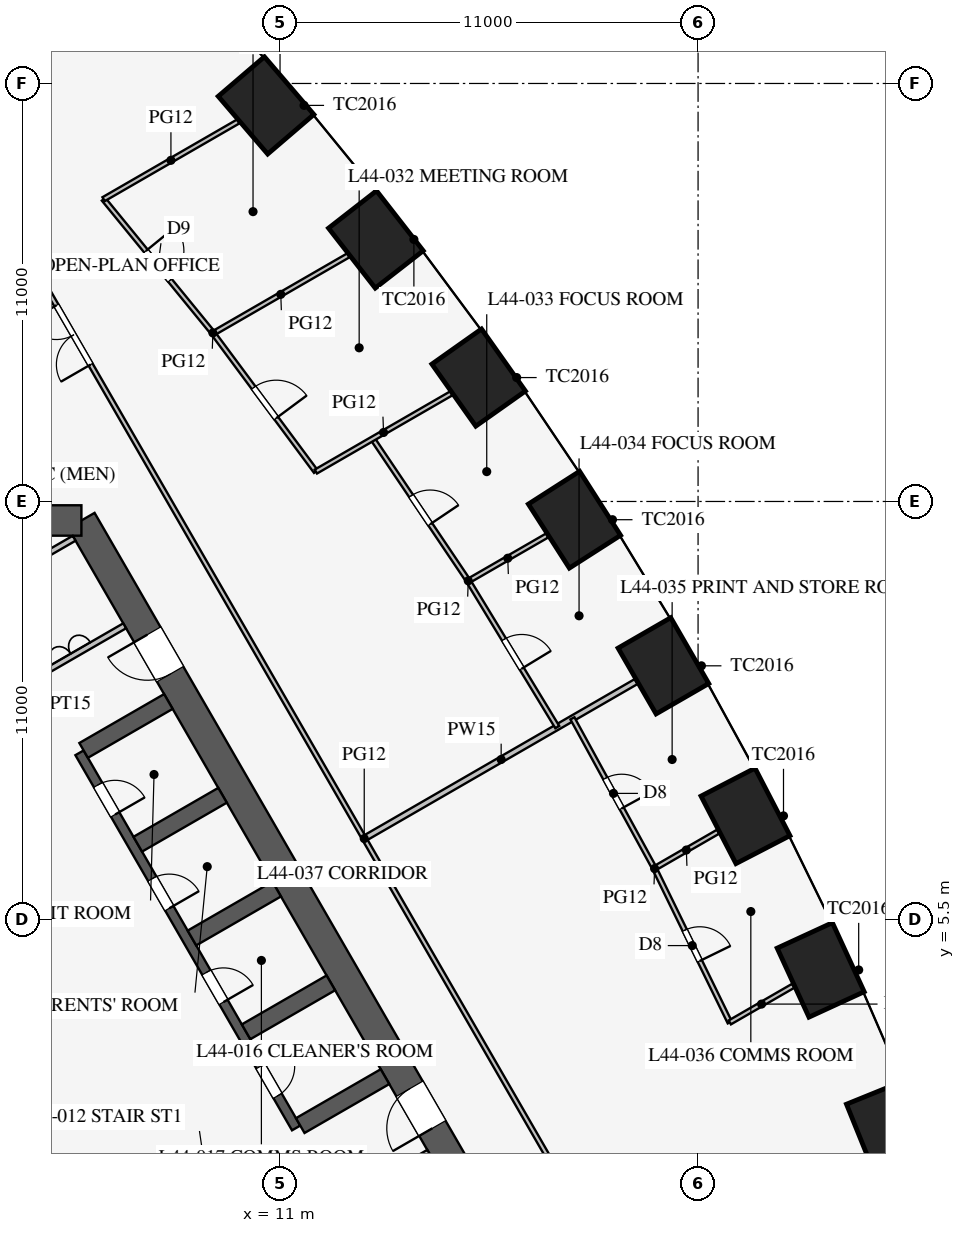
"""IFC4 building model, lengths in metres.
Left out: names, types, materials, properties, quantities, classifications, styles, units other than length and angle.
Written with IfcOpenShell. Run it as: python <this file> out.ifc"""

import sys

from ifc_helpers import new_model, si_unit, direction, frame, frame_2d, origin, origin_2d, place, context, subcontext, project, spatial, rectangle, extrude, element, fill, save


model = new_model("IFC4")
c1 = context("Model", 3, precision=1e-05, world=origin(), true_north=direction((0.0, 1.0)))
c2 = subcontext(c1, "Body", "Model", "MODEL_VIEW")
j1 = project(units=[si_unit("LENGTHUNIT", "METRE"), si_unit("PLANEANGLEUNIT", "RADIAN")], contexts=[c1])
p1 = place(None, origin())
s1 = spatial("IfcSite", under=j1, at=p1, CompositionType="ELEMENT")
p2 = place(p1, origin())
s2 = spatial("IfcBuilding", under=s1, at=p2, CompositionType="ELEMENT")
p3 = place(p2, frame((0.0, 0.0, 193.9)))
s3 = spatial("IfcBuildingStorey", under=s2, at=p3, CompositionType="ELEMENT", Elevation=193.9)
for number, where, z_axis, x_axis in (
    (1, (27.022, 0.013, 0.0), (0.0, 0.0, 1.0), (-0.376, 0.927, 0.0)),
    (2, (25.227, 4.172, 0.0), (0.0, 0.0, 1.0), (-0.418, 0.908, 0.0)),
    (3, (23.248, 8.226, 0.0), (0.0, 0.0, 1.0), (-0.46, 0.888, 0.0)),
    (4, (21.088, 12.175, 0.0), (0.0, 0.0, 1.0), (-0.5, 0.866, 0.0)),
    (5, (18.748, 16.02, 0.0), (0.0, 0.0, 1.0), (-0.539, 0.842, 0.0)),
    (6, (16.227, 19.761, 0.0), (0.0, 0.0, 1.0), (-0.577, 0.816, 0.0)),
    (7, (13.522, 23.396, 0.0), (0.0, 0.0, 1.0), (-0.615, 0.789, 0.0)),
    (8, (10.632, 26.923, 0.0), (0.0, 0.0, 1.0), (-0.651, 0.759, 0.0)),
):
    element("IfcColumn", number, at=place(p3, frame(where, z_axis=z_axis, x_axis=x_axis)), inside=s3, PredefinedType="COLUMN", context=c2, shape_type="SweptSolid", body=[
        extrude(rectangle(XDim=2.0, YDim=1.6, at=origin_2d()), origin(), (0.0, 0.0, 1.0), 4.2),
    ])
p4 = place(p3, frame((16.743, -3.0, 0.0), z_axis=(0.0, 0.0, 1.0), x_axis=(-0.500002442456, 0.866023993627, 0.0)))
e9 = element("IfcWall", 9, at=p4, inside=s3, PredefinedType="SHEAR", context=c2, shape_type="SweptSolid", body=[
    extrude(rectangle(XDim=21.939, YDim=0.8, at=frame_2d((10.97, 0.0))), origin(), (0.0, 0.0, 1.0), 4.2),
])
p5 = place(p4, frame((17.27, 0.0, 0.0)))
e10 = element("IfcOpeningElement", 10, at=p5, cuts=e9, PredefinedType="OPENING", context=c2, shape_type="SweptSolid", body=[
    extrude(rectangle(XDim=1.2, YDim=2.1, at=frame_2d((0.6, 1.05))), frame((0.0, 0.41, 0.0), z_axis=(0.0, -1.0, 0.0), x_axis=(1.0, 0.0, 0.0)), (0.0, 0.0, 1.0), 0.82),
])
p6 = place(p4, frame((3.47, 0.0, 0.0)))
e11 = element("IfcOpeningElement", 11, at=p6, cuts=e9, PredefinedType="OPENING", context=c2, shape_type="SweptSolid", body=[
    extrude(rectangle(XDim=1.2, YDim=2.1, at=frame_2d((0.6, 1.05))), frame((0.0, 0.41, 0.0), z_axis=(0.0, -1.0, 0.0), x_axis=(1.0, 0.0, 0.0)), (0.0, 0.0, 1.0), 0.82),
])
p7 = place(p3, frame((5.773, 16.0, 0.0), z_axis=(0.0, 0.0, 1.0), x_axis=(-1.0, 0.0, 0.0)))
e12 = element("IfcWall", 12, at=p7, inside=s3, PredefinedType="SHEAR", context=c2, shape_type="SweptSolid", body=[
    extrude(rectangle(XDim=11.547, YDim=0.8, at=frame_2d((5.773, 0.0))), origin(), (0.0, 0.0, 1.0), 4.2),
])
p8 = place(p3, frame((11.424, 0.014, 0.0), z_axis=(0.0, 0.0, 1.0), x_axis=(-0.500001763848, 0.866024385424, 0.0)))
e13 = element("IfcWall", 13, at=p8, inside=s3, PredefinedType="SHEAR", context=c2, shape_type="SweptSolid", body=[
    extrude(rectangle(XDim=11.4, YDim=0.25, at=frame_2d((5.7, 0.0))), origin(), (0.0, 0.0, 1.0), 4.2),
])
p9 = place(p8, frame((0.975, 0.0, 0.0)))
e14 = element("IfcOpeningElement", 14, at=p9, cuts=e13, PredefinedType="OPENING", context=c2, shape_type="SweptSolid", body=[
    extrude(rectangle(XDim=0.9, YDim=2.1, at=frame_2d((0.45, 1.05))), frame((0.0, 0.135, 0.0), z_axis=(0.0, -1.0, 0.0), x_axis=(1.0, 0.0, 0.0)), (0.0, 0.0, 1.0), 0.27),
])
p10 = place(p8, frame((3.825, 0.0, 0.0)))
e15 = element("IfcOpeningElement", 15, at=p10, cuts=e13, PredefinedType="OPENING", context=c2, shape_type="SweptSolid", body=[
    extrude(rectangle(XDim=0.9, YDim=2.1, at=frame_2d((0.45, 1.05))), frame((0.0, 0.135, 0.0), z_axis=(0.0, -1.0, 0.0), x_axis=(1.0, 0.0, 0.0)), (0.0, 0.0, 1.0), 0.27),
])
p11 = place(p8, frame((6.675, 0.0, 0.0)))
e16 = element("IfcOpeningElement", 16, at=p11, cuts=e13, PredefinedType="OPENING", context=c2, shape_type="SweptSolid", body=[
    extrude(rectangle(XDim=0.9, YDim=2.1, at=frame_2d((0.45, 1.05))), frame((0.0, 0.135, 0.0), z_axis=(0.0, -1.0, 0.0), x_axis=(1.0, 0.0, 0.0)), (0.0, 0.0, 1.0), 0.27),
])
p12 = place(p8, frame((9.525, 0.0, 0.0)))
e17 = element("IfcOpeningElement", 17, at=p12, cuts=e13, PredefinedType="OPENING", context=c2, shape_type="SweptSolid", body=[
    extrude(rectangle(XDim=0.9, YDim=2.1, at=frame_2d((0.45, 1.05))), frame((0.0, 0.135, 0.0), z_axis=(0.0, -1.0, 0.0), x_axis=(1.0, 0.0, 0.0)), (0.0, 0.0, 1.0), 0.27),
])
for number, where, z_axis, x_axis in (
    (18, (11.532, 0.076, 0.0), (0.0, 0.0, 1.0), (0.866, 0.5, 0.0)),
    (19, (10.107, 2.544, 0.0), (0.0, 0.0, 1.0), (0.866, 0.5, 0.0)),
    (20, (8.682, 5.012, 0.0), (0.0, 0.0, 1.0), (0.866, 0.5, 0.0)),
    (21, (7.257, 7.481, 0.0), (0.0, 0.0, 1.0), (0.866, 0.5, 0.0)),
):
    element("IfcWall", number, at=place(p3, frame(where, z_axis=z_axis, x_axis=x_axis)), inside=s3, PredefinedType="SHEAR", context=c2, shape_type="SweptSolid", body=[
        extrude(rectangle(XDim=2.575, YDim=0.45, at=frame_2d((1.288, 0.0))), origin(), (0.0, 0.0, 1.0), 4.2),
    ])
p13 = place(p3, frame((5.832, 9.949, 0.0), z_axis=(0.0, 0.0, 1.0), x_axis=(0.866029291668, 0.499993265928, 0.0)))
e22 = element("IfcWall", 22, at=p13, inside=s3, PredefinedType="SHEAR", context=c2, shape_type="SweptSolid", body=[
    extrude(rectangle(XDim=2.575, YDim=0.45, at=frame_2d((1.288, 0.0))), origin(), (0.0, 0.0, 1.0), 4.2),
])
p14 = place(p3, frame((2.495, 10.678, 0.0), z_axis=(0.0, 0.0, 1.0), x_axis=(0.86602216432, 0.500005610874, 0.0)))
e23 = element("IfcWall", 23, at=p14, inside=s3, PredefinedType="PARTITIONING", context=c2, shape_type="SweptSolid", body=[
    extrude(rectangle(XDim=5.1, YDim=0.15, at=frame_2d((2.55, 0.0))), origin(), (0.0, 0.0, 1.0), 4.0),
])
p15 = place(p14, frame((1.3, 0.0, 0.0)))
e24 = element("IfcOpeningElement", 24, at=p15, cuts=e23, PredefinedType="OPENING", context=c2, shape_type="SweptSolid", body=[
    extrude(rectangle(XDim=0.9, YDim=2.1, at=frame_2d((0.45, 1.05))), frame((0.0, 0.085, 0.0), z_axis=(0.0, -1.0, 0.0), x_axis=(1.0, 0.0, 0.0)), (0.0, 0.0, 1.0), 0.17),
])
p16 = place(p3, frame((10.495, -3.178, 0.0), z_axis=(0.0, 0.0, 1.0), x_axis=(0.86602216432, 0.500005610874, 0.0)))
e25 = element("IfcWall", 25, at=p16, inside=s3, PredefinedType="PARTITIONING", context=c2, shape_type="SweptSolid", body=[
    extrude(rectangle(XDim=5.1, YDim=0.15, at=frame_2d((2.55, 0.0))), origin(), (0.0, 0.0, 1.0), 4.0),
])
p17 = place(p16, frame((2.6, 0.0, 0.0)))
e26 = element("IfcOpeningElement", 26, at=p17, cuts=e25, PredefinedType="OPENING", context=c2, shape_type="SweptSolid", body=[
    extrude(rectangle(XDim=0.9, YDim=2.1, at=frame_2d((0.45, 1.05))), frame((0.0, 0.085, 0.0), z_axis=(0.0, -1.0, 0.0), x_axis=(1.0, 0.0, 0.0)), (0.0, 0.0, 1.0), 0.17),
])
p18 = place(p3, frame((2.031, 13.482, 0.0), z_axis=(0.0, 0.0, 1.0), x_axis=(0.866050731258, 0.499956128963, 0.0)))
e27 = element("IfcWall", 27, at=p18, inside=s3, PredefinedType="PARTITIONING", context=c2, shape_type="SweptSolid", body=[
    extrude(rectangle(XDim=4.1, YDim=0.15, at=frame_2d((2.05, 0.0))), origin(), (0.0, 0.0, 1.0), 4.0),
])
p19 = place(p3, frame((13.268, 7.66, 0.0), z_axis=(0.0, 0.0, 1.0), x_axis=(0.866019499219, 0.500010226868, 0.0)))
e28 = element("IfcWall", 28, at=p19, inside=s3, PredefinedType="PARTITIONING", context=c2, shape_type="SweptSolid", body=[
    extrude(rectangle(XDim=8.2, YDim=0.15, at=frame_2d((4.1, 0.0))), origin(), (0.0, 0.0, 1.0), 2.992),
])
p20 = place(p3, frame((26.415, -15.231, 0.0), z_axis=(0.0, 0.0, 1.0), x_axis=(-0.50000091641, 0.866024874695, 0.0)))
e29 = element("IfcWall", 29, at=p20, inside=s3, PredefinedType="PARTITIONING", context=c2, shape_type="SweptSolid", body=[
    extrude(rectangle(XDim=52.796, YDim=0.12, at=frame_2d((26.398, 0.0))), origin(), (0.0, 0.0, 1.0), 2.9),
])
p21 = place(p20, frame((10.2, 0.0, 0.15)))
e30 = element("IfcOpeningElement", 30, at=p21, cuts=e29, PredefinedType="OPENING", context=c2, shape_type="SweptSolid", body=[
    extrude(rectangle(XDim=1.8, YDim=2.1, at=frame_2d((0.9, 1.05))), frame((0.0, 0.07, 0.0), z_axis=(0.0, -1.0, 0.0), x_axis=(1.0, 0.0, 0.0)), (0.0, 0.0, 1.0), 0.14),
])
p22 = place(p20, frame((40.8, 0.0, 0.15)))
e31 = element("IfcOpeningElement", 31, at=p22, cuts=e29, PredefinedType="OPENING", context=c2, shape_type="SweptSolid", body=[
    extrude(rectangle(XDim=1.8, YDim=2.1, at=frame_2d((0.9, 1.05))), frame((0.0, 0.07, 0.0), z_axis=(0.0, -1.0, 0.0), x_axis=(1.0, 0.0, 0.0)), (0.0, 0.0, 1.0), 0.14),
])
p23 = place(p3, frame((18.295, 10.563, 0.0), z_axis=(0.0, 0.0, 1.0), x_axis=(-0.519766265397, 0.854308509472, 0.0)))
e32 = element("IfcWall", 32, at=p23, inside=s3, PredefinedType="PARTITIONING", context=c2, shape_type="SweptSolid", body=[
    extrude(rectangle(XDim=4.501, YDim=0.12, at=frame_2d((2.25, 0.0))), origin(), (0.0, 0.0, 1.0), 2.9),
])
p24 = place(p23, frame((1.8, 0.0, 0.15)))
e33 = element("IfcOpeningElement", 33, at=p24, cuts=e32, PredefinedType="OPENING", context=c2, shape_type="SweptSolid", body=[
    extrude(rectangle(XDim=0.9, YDim=2.1, at=frame_2d((0.45, 1.05))), frame((0.0, 0.07, 0.0), z_axis=(0.0, -1.0, 0.0), x_axis=(1.0, 0.0, 0.0)), (0.0, 0.0, 1.0), 0.14),
])
p25 = place(p3, frame((9.242, 20.924, 0.0), z_axis=(0.0, 0.0, 1.0), x_axis=(-0.632765292047, 0.774343647989, 0.0)))
e34 = element("IfcWall", 34, at=p25, inside=s3, PredefinedType="PARTITIONING", context=c2, shape_type="SweptSolid", body=[
    extrude(rectangle(XDim=4.559, YDim=0.12, at=frame_2d((2.28, 0.0))), origin(), (0.0, 0.0, 1.0), 2.9),
])
p26 = place(p25, frame((1.8, 0.0, 0.15)))
e35 = element("IfcOpeningElement", 35, at=p26, cuts=e34, PredefinedType="OPENING", context=c2, shape_type="SweptSolid", body=[
    extrude(rectangle(XDim=1.0, YDim=2.1, at=frame_2d((0.5, 1.05))), frame((0.0, 0.07, 0.0), z_axis=(0.0, -1.0, 0.0), x_axis=(1.0, 0.0, 0.0)), (0.0, 0.0, 1.0), 0.14),
])
p27 = place(p3, frame((15.956, 14.408, 0.0), z_axis=(0.0, 0.0, 1.0), x_axis=(-0.55850386778, 0.829501916619, 0.0)))
e36 = element("IfcWall", 36, at=p27, inside=s3, PredefinedType="PARTITIONING", context=c2, shape_type="SweptSolid", body=[
    extrude(rectangle(XDim=4.511, YDim=0.12, at=frame_2d((2.255, 0.0))), origin(), (0.0, 0.0, 1.0), 2.9),
])
p28 = place(p27, frame((1.8, 0.0, 0.15)))
e37 = element("IfcOpeningElement", 37, at=p28, cuts=e36, PredefinedType="OPENING", context=c2, shape_type="SweptSolid", body=[
    extrude(rectangle(XDim=0.9, YDim=2.1, at=frame_2d((0.45, 1.05))), frame((0.0, 0.07, 0.0), z_axis=(0.0, -1.0, 0.0), x_axis=(1.0, 0.0, 0.0)), (0.0, 0.0, 1.0), 0.14),
])
p29 = place(p3, frame((11.943, 17.287, 0.0), z_axis=(0.0, 0.0, 1.0), x_axis=(-0.59613842716, 0.802881669777, 0.0)))
e38 = element("IfcWall", 38, at=p29, inside=s3, PredefinedType="PARTITIONING", context=c2, shape_type="SweptSolid", body=[
    extrude(rectangle(XDim=4.53, YDim=0.12, at=frame_2d((2.265, 0.0))), origin(), (0.0, 0.0, 1.0), 2.9),
])
p30 = place(p29, frame((1.75, 0.0, 0.15)))
e39 = element("IfcOpeningElement", 39, at=p30, cuts=e38, PredefinedType="OPENING", context=c2, shape_type="SweptSolid", body=[
    extrude(rectangle(XDim=1.0, YDim=2.1, at=frame_2d((0.5, 1.05))), frame((0.0, 0.07, 0.0), z_axis=(0.0, -1.0, 0.0), x_axis=(1.0, 0.0, 0.0)), (0.0, 0.0, 1.0), 0.14),
])
p31 = place(p3, frame((20.854, 6.844, 0.0), z_axis=(0.0, 0.0, 1.0), x_axis=(-0.480014565702, 0.877260518155, 0.0)))
e40 = element("IfcWall", 40, at=p31, inside=s3, PredefinedType="PARTITIONING", context=c2, shape_type="SweptSolid", body=[
    extrude(rectangle(XDim=4.501, YDim=0.12, at=frame_2d((2.25, 0.0))), origin(), (0.0, 0.0, 1.0), 2.9),
])
p32 = place(p31, frame((1.8, 0.0, 0.15)))
e41 = element("IfcOpeningElement", 41, at=p32, cuts=e40, PredefinedType="OPENING", context=c2, shape_type="SweptSolid", body=[
    extrude(rectangle(XDim=0.9, YDim=2.1, at=frame_2d((0.45, 1.05))), frame((0.0, 0.07, 0.0), z_axis=(0.0, -1.0, 0.0), x_axis=(1.0, 0.0, 0.0)), (0.0, 0.0, 1.0), 0.14),
])
p33 = place(p3, frame((22.835, 2.792, 0.0), z_axis=(0.0, 0.0, 1.0), x_axis=(-0.43911984878, 0.898428493764, 0.0)))
e42 = element("IfcWall", 42, at=p33, inside=s3, PredefinedType="PARTITIONING", context=c2, shape_type="SweptSolid", body=[
    extrude(rectangle(XDim=4.511, YDim=0.12, at=frame_2d((2.255, 0.0))), origin(), (0.0, 0.0, 1.0), 2.9),
])
p34 = place(p33, frame((1.8, 0.0, 0.15)))
e43 = element("IfcOpeningElement", 43, at=p34, cuts=e42, PredefinedType="OPENING", context=c2, shape_type="SweptSolid", body=[
    extrude(rectangle(XDim=0.9, YDim=2.1, at=frame_2d((0.45, 1.05))), frame((0.0, 0.07, 0.0), z_axis=(0.0, -1.0, 0.0), x_axis=(1.0, 0.0, 0.0)), (0.0, 0.0, 1.0), 0.14),
])
p35 = place(p3, frame((9.242, 20.924, 0.0), z_axis=(0.0, 0.0, 1.0), x_axis=(0.866016197294, 0.500015945769, 0.0)))
e44 = element("IfcWall", 44, at=p35, inside=s3, PredefinedType="PARTITIONING", context=c2, shape_type="SweptSolid", body=[
    extrude(rectangle(XDim=4.104, YDim=0.12, at=frame_2d((2.052, 0.0))), origin(), (0.0, 0.0, 1.0), 2.8),
])
p36 = place(p3, frame((6.357, 24.455, 0.0), z_axis=(0.0, 0.0, 1.0), x_axis=(0.866005746929, 0.500034045127, 0.0)))
e45 = element("IfcWall", 45, at=p36, inside=s3, PredefinedType="PARTITIONING", context=c2, shape_type="SweptSolid", body=[
    extrude(rectangle(XDim=4.092, YDim=0.12, at=frame_2d((2.046, 0.0))), origin(), (0.0, 0.0, 1.0), 2.8),
])
p37 = place(p3, frame((15.956, 14.408, 0.0), z_axis=(0.0, 0.0, 1.0), x_axis=(0.86598681336, 0.50006683462, 0.0)))
e46 = element("IfcWall", 46, at=p37, inside=s3, PredefinedType="PARTITIONING", context=c2, shape_type="SweptSolid", body=[
    extrude(rectangle(XDim=2.393, YDim=0.12, at=frame_2d((1.197, 0.0))), origin(), (0.0, 0.0, 1.0), 2.9),
])
p38 = place(p3, frame((11.943, 17.287, 0.0), z_axis=(0.0, 0.0, 1.0), x_axis=(0.866013591525, 0.500020458876, 0.0)))
e47 = element("IfcWall", 47, at=p38, inside=s3, PredefinedType="PARTITIONING", context=c2, shape_type="SweptSolid", body=[
    extrude(rectangle(XDim=4.113, YDim=0.12, at=frame_2d((2.057, 0.0))), origin(), (0.0, 0.0, 1.0), 2.9),
])
p39 = place(p3, frame((20.854, 6.844, 0.0), z_axis=(0.0, 0.0, 1.0), x_axis=(0.866019431537, 0.500010344094, 0.0)))
e48 = element("IfcWall", 48, at=p39, inside=s3, PredefinedType="PARTITIONING", context=c2, shape_type="SweptSolid", body=[
    extrude(rectangle(XDim=1.933, YDim=0.12, at=frame_2d((0.967, 0.0))), origin(), (0.0, 0.0, 1.0), 2.9),
])
p40 = place(p3, frame((22.835, 2.792, 0.0), z_axis=(0.0, 0.0, 1.0), x_axis=(0.865997904316, 0.500047627452, 0.0)))
e49 = element("IfcWall", 49, at=p40, inside=s3, PredefinedType="PARTITIONING", context=c2, shape_type="SweptSolid", body=[
    extrude(rectangle(XDim=1.928, YDim=0.12, at=frame_2d((0.964, 0.0))), origin(), (0.0, 0.0, 1.0), 2.9),
])
p41 = place(p5, origin())
e50 = element("IfcDoor", 50, at=p41, inside=s3, OperationType="SINGLE_SWING_RIGHT", PredefinedType="DOOR", context=c2, shape_type="SweptSolid", body=[
    extrude(rectangle(XDim=1.2, YDim=2.1, at=frame_2d((0.6, 1.05))), frame((0.0, 0.025, 0.0), z_axis=(0.0, -1.0, 0.0), x_axis=(1.0, 0.0, 0.0)), (0.0, 0.0, 1.0), 0.05),
])
fill(e10, e50)
p42 = place(p6, origin())
e51 = element("IfcDoor", 51, at=p42, inside=s3, OperationType="SINGLE_SWING_LEFT", PredefinedType="DOOR", context=c2, shape_type="SweptSolid", body=[
    extrude(rectangle(XDim=1.2, YDim=2.1, at=frame_2d((0.6, 1.05))), frame((0.0, 0.025, 0.0), z_axis=(0.0, -1.0, 0.0), x_axis=(1.0, 0.0, 0.0)), (0.0, 0.0, 1.0), 0.05),
])
fill(e11, e51)
p43 = place(p9, frame((0.9, 0.0, 0.0), z_axis=(0.0, 0.0, 1.0), x_axis=(-1.0, 0.0, 0.0)))
e52 = element("IfcDoor", 52, at=p43, inside=s3, OperationType="SINGLE_SWING_LEFT", PredefinedType="DOOR", context=c2, shape_type="SweptSolid", body=[
    extrude(rectangle(XDim=0.9, YDim=2.1, at=frame_2d((0.45, 1.05))), frame((0.0, 0.025, 0.0), z_axis=(0.0, -1.0, 0.0), x_axis=(1.0, 0.0, 0.0)), (0.0, 0.0, 1.0), 0.05),
])
fill(e14, e52)
p44 = place(p10, frame((0.9, 0.0, 0.0), z_axis=(0.0, 0.0, 1.0), x_axis=(-1.0, 0.0, 0.0)))
e53 = element("IfcDoor", 53, at=p44, inside=s3, OperationType="SINGLE_SWING_RIGHT", PredefinedType="DOOR", context=c2, shape_type="SweptSolid", body=[
    extrude(rectangle(XDim=0.9, YDim=2.1, at=frame_2d((0.45, 1.05))), frame((0.0, 0.025, 0.0), z_axis=(0.0, -1.0, 0.0), x_axis=(1.0, 0.0, 0.0)), (0.0, 0.0, 1.0), 0.05),
])
fill(e15, e53)
p45 = place(p11, frame((0.9, 0.0, 0.0), z_axis=(0.0, 0.0, 1.0), x_axis=(-1.0, 0.0, 0.0)))
e54 = element("IfcDoor", 54, at=p45, inside=s3, OperationType="SINGLE_SWING_RIGHT", PredefinedType="DOOR", context=c2, shape_type="SweptSolid", body=[
    extrude(rectangle(XDim=0.9, YDim=2.1, at=frame_2d((0.45, 1.05))), frame((0.0, 0.025, 0.0), z_axis=(0.0, -1.0, 0.0), x_axis=(1.0, 0.0, 0.0)), (0.0, 0.0, 1.0), 0.05),
])
fill(e16, e54)
p46 = place(p12, frame((0.9, 0.0, 0.0), z_axis=(0.0, 0.0, 1.0), x_axis=(-1.0, 0.0, 0.0)))
e55 = element("IfcDoor", 55, at=p46, inside=s3, OperationType="SINGLE_SWING_RIGHT", PredefinedType="DOOR", context=c2, shape_type="SweptSolid", body=[
    extrude(rectangle(XDim=0.9, YDim=2.1, at=frame_2d((0.45, 1.05))), frame((0.0, 0.025, 0.0), z_axis=(0.0, -1.0, 0.0), x_axis=(1.0, 0.0, 0.0)), (0.0, 0.0, 1.0), 0.05),
])
fill(e17, e55)
p47 = place(p26, frame((1.0, 0.0, 0.0), z_axis=(0.0, 0.0, 1.0), x_axis=(-1.0, 0.0, 0.0)))
e56 = element("IfcDoor", 56, at=p47, inside=s3, OperationType="SINGLE_SWING_LEFT", PredefinedType="DOOR", context=c2, shape_type="SweptSolid", body=[
    extrude(rectangle(XDim=1.0, YDim=2.1, at=frame_2d((0.5, 1.05))), frame((0.0, 0.025, 0.0), z_axis=(0.0, -1.0, 0.0), x_axis=(1.0, 0.0, 0.0)), (0.0, 0.0, 1.0), 0.05),
])
fill(e35, e56)
p48 = place(p30, frame((1.0, 0.0, 0.0), z_axis=(0.0, 0.0, 1.0), x_axis=(-1.0, 0.0, 0.0)))
e57 = element("IfcDoor", 57, at=p48, inside=s3, OperationType="SINGLE_SWING_RIGHT", PredefinedType="DOOR", context=c2, shape_type="SweptSolid", body=[
    extrude(rectangle(XDim=1.0, YDim=2.1, at=frame_2d((0.5, 1.05))), frame((0.0, 0.025, 0.0), z_axis=(0.0, -1.0, 0.0), x_axis=(1.0, 0.0, 0.0)), (0.0, 0.0, 1.0), 0.05),
])
fill(e39, e57)
p49 = place(p28, frame((0.9, 0.0, 0.0), z_axis=(0.0, 0.0, 1.0), x_axis=(-1.0, 0.0, 0.0)))
e58 = element("IfcDoor", 58, at=p49, inside=s3, OperationType="SINGLE_SWING_RIGHT", PredefinedType="DOOR", context=c2, shape_type="SweptSolid", body=[
    extrude(rectangle(XDim=0.9, YDim=2.1, at=frame_2d((0.45, 1.05))), frame((0.0, 0.025, 0.0), z_axis=(0.0, -1.0, 0.0), x_axis=(1.0, 0.0, 0.0)), (0.0, 0.0, 1.0), 0.05),
])
fill(e37, e58)
p50 = place(p24, frame((0.9, 0.0, 0.0), z_axis=(0.0, 0.0, 1.0), x_axis=(-1.0, 0.0, 0.0)))
e59 = element("IfcDoor", 59, at=p50, inside=s3, OperationType="SINGLE_SWING_RIGHT", PredefinedType="DOOR", context=c2, shape_type="SweptSolid", body=[
    extrude(rectangle(XDim=0.9, YDim=2.1, at=frame_2d((0.45, 1.05))), frame((0.0, 0.025, 0.0), z_axis=(0.0, -1.0, 0.0), x_axis=(1.0, 0.0, 0.0)), (0.0, 0.0, 1.0), 0.05),
])
fill(e33, e59)
p51 = place(p32, frame((0.9, 0.0, 0.0), z_axis=(0.0, 0.0, 1.0), x_axis=(-1.0, 0.0, 0.0)))
e60 = element("IfcDoor", 60, at=p51, inside=s3, OperationType="SINGLE_SWING_RIGHT", PredefinedType="DOOR", context=c2, shape_type="SweptSolid", body=[
    extrude(rectangle(XDim=0.9, YDim=2.1, at=frame_2d((0.45, 1.05))), frame((0.0, 0.025, 0.0), z_axis=(0.0, -1.0, 0.0), x_axis=(1.0, 0.0, 0.0)), (0.0, 0.0, 1.0), 0.05),
])
fill(e41, e60)
p52 = place(p34, frame((0.9, 0.0, 0.0), z_axis=(0.0, 0.0, 1.0), x_axis=(-1.0, 0.0, 0.0)))
e61 = element("IfcDoor", 61, at=p52, inside=s3, OperationType="SINGLE_SWING_RIGHT", PredefinedType="DOOR", context=c2, shape_type="SweptSolid", body=[
    extrude(rectangle(XDim=0.9, YDim=2.1, at=frame_2d((0.45, 1.05))), frame((0.0, 0.025, 0.0), z_axis=(0.0, -1.0, 0.0), x_axis=(1.0, 0.0, 0.0)), (0.0, 0.0, 1.0), 0.05),
])
fill(e43, e61)
p53 = place(p22, origin())
e62 = element("IfcDoor", 62, at=p53, inside=s3, OperationType="DOUBLE_DOOR_SINGLE_SWING", PredefinedType="DOOR", context=c2, shape_type="SweptSolid", body=[
    extrude(rectangle(XDim=1.8, YDim=2.1, at=frame_2d((0.9, 1.05))), frame((0.0, 0.025, 0.0), z_axis=(0.0, -1.0, 0.0), x_axis=(1.0, 0.0, 0.0)), (0.0, 0.0, 1.0), 0.05),
])
fill(e31, e62)
save(model, sys.argv[1])
